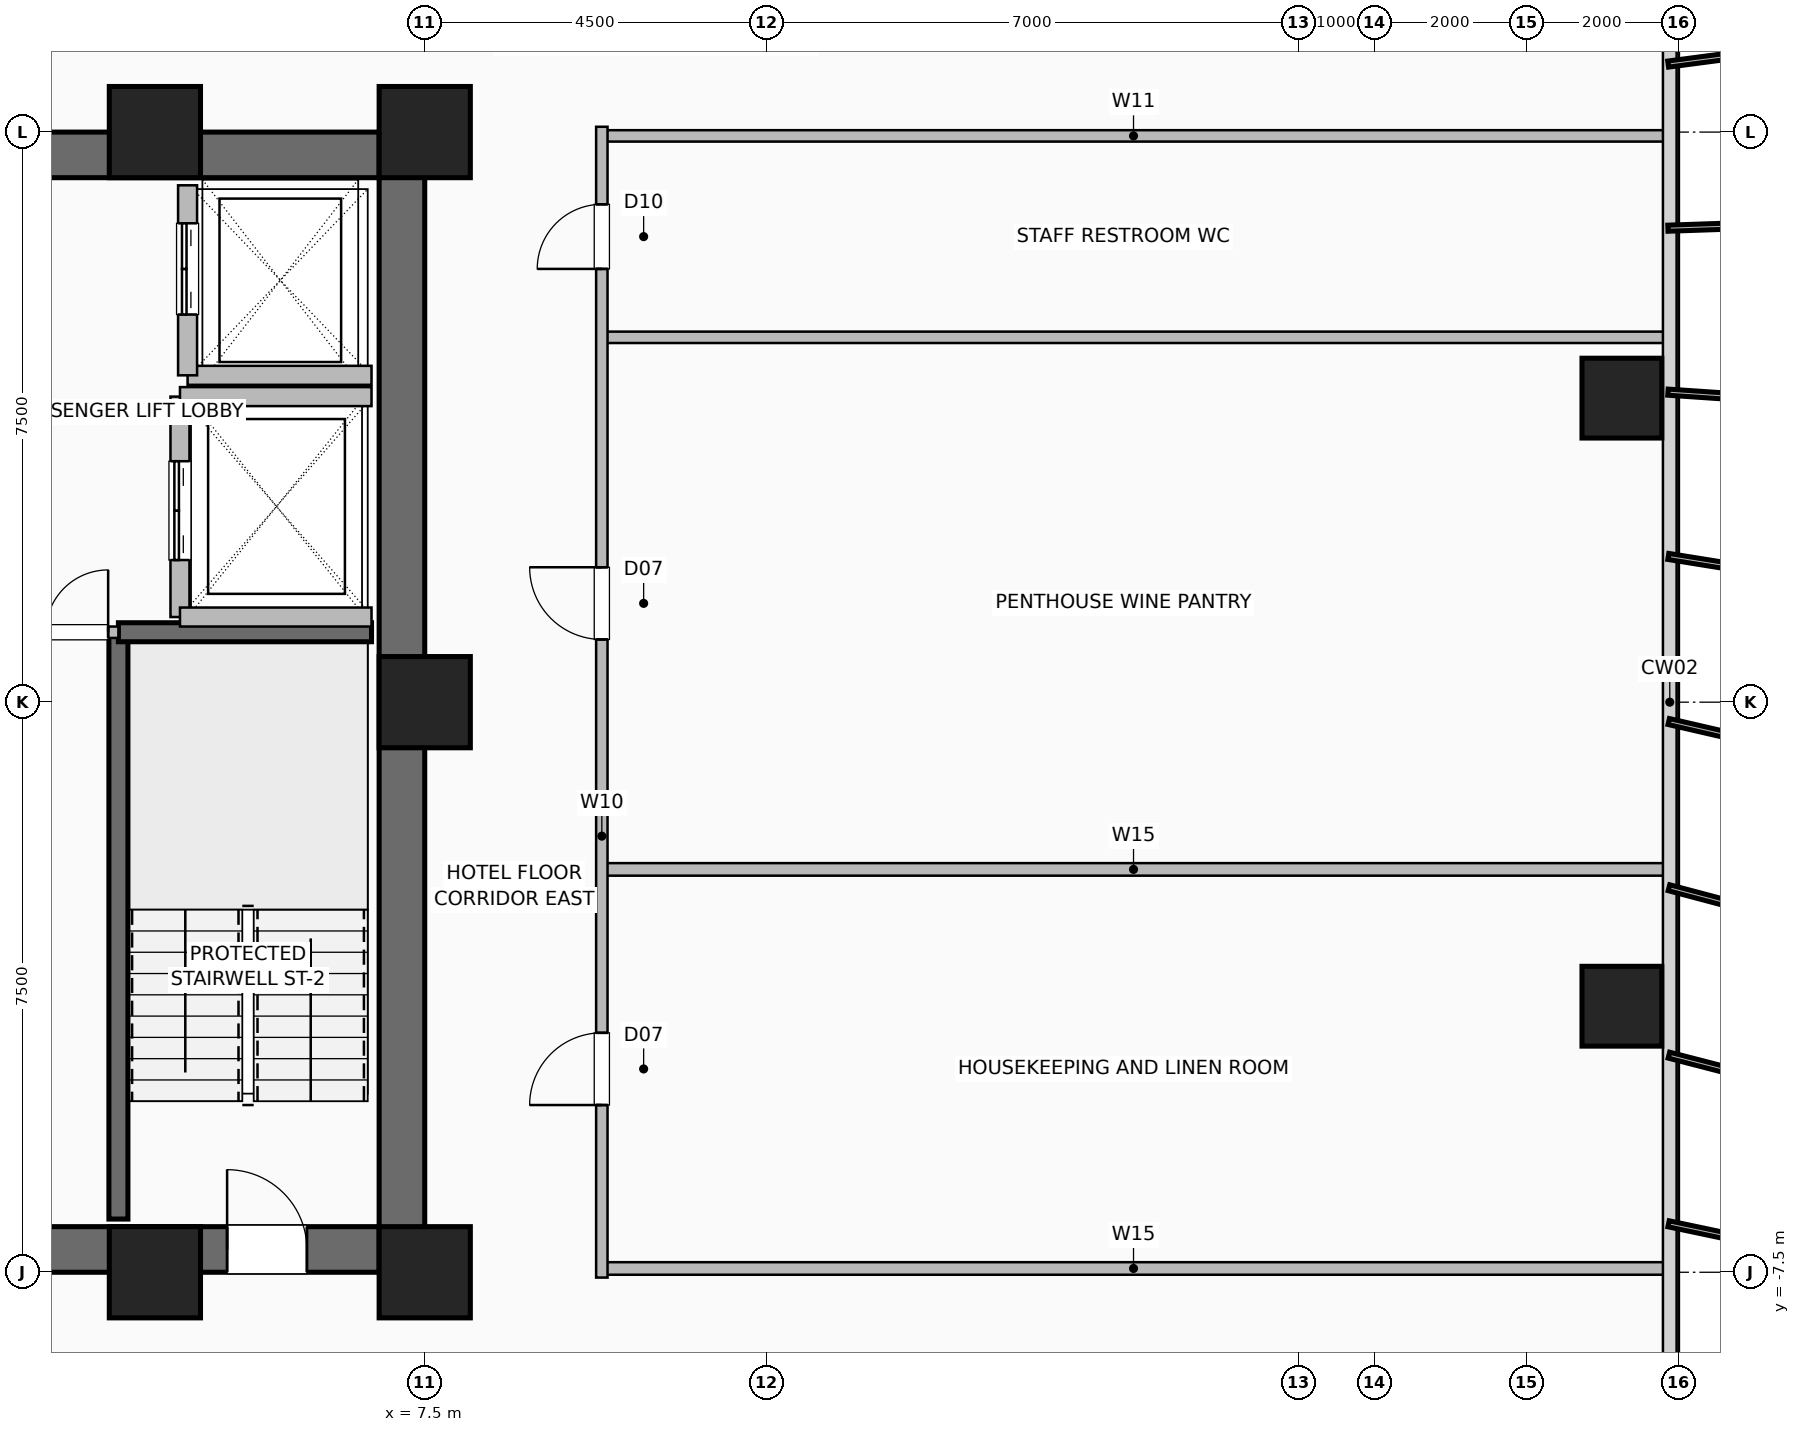
"""IFC4 building model, lengths in metres.
Left out: names, types, materials, properties, quantities, classifications, styles, units other than length and angle.
Written with IfcOpenShell. Run it as: python <this file> out.ifc"""

import sys

from ifc_helpers import new_model, si_unit, direction, frame, frame_2d, origin, origin_2d, place, context, subcontext, project, spatial, rectangle, hollow_rectangle, extrude, element, fill, save


model = new_model("IFC4")
c1 = context("Model", 3, precision=1e-05, world=origin(), true_north=direction((0.0, 1.0)))
c2 = subcontext(c1, "Body", "Model", "MODEL_VIEW")
j1 = project(units=[si_unit("LENGTHUNIT", "METRE"), si_unit("PLANEANGLEUNIT", "RADIAN")], contexts=[c1])
p1 = place(None, origin())
s1 = spatial("IfcSite", under=j1, at=p1, CompositionType="ELEMENT")
p2 = place(p1, origin())
s2 = spatial("IfcBuilding", under=s1, at=p2, CompositionType="ELEMENT")
p3 = place(p2, frame((0.0, 0.0, 79.5)))
s3 = spatial("IfcBuildingStorey", under=s2, at=p3, CompositionType="ELEMENT", Elevation=79.5)
for number, where, z_axis, x_axis in (
    (1, (3.95, -7.5, 0.0), (0.0, 0.0, 1.0), (1.0, 0.0, 0.0)),
    (2, (7.5, -7.5, 0.0), (0.0, 0.0, 1.0), (1.0, 0.0, 0.0)),
    (3, (7.5, 0.0, 0.0), (0.0, 0.0, 1.0), (1.0, 0.0, 0.0)),
    (4, (7.5, 7.5, 0.0), (0.0, 0.0, 1.0), (1.0, 0.0, 0.0)),
    (5, (3.95, 7.5, 0.0), (0.0, 0.0, 1.0), (1.0, 0.0, 0.0)),
):
    element("IfcColumn", number, at=place(p3, frame(where, z_axis=z_axis, x_axis=x_axis)), inside=s3, PredefinedType="COLUMN", context=c2, shape_type="SweptSolid", body=[
        extrude(hollow_rectangle(XDim=1.2, YDim=1.2, WallThickness=0.055, at=origin_2d()), origin(), (0.0, 0.0, 1.0), 3.5),
    ])
for number, where, z_axis, x_axis in (
    (6, (23.25, -4.0, 0.0), (0.0, 0.0, 1.0), (1.0, 0.0, 0.0)),
    (7, (23.25, 4.0, 0.0), (0.0, 0.0, 1.0), (1.0, 0.0, 0.0)),
):
    element("IfcColumn", number, at=place(p3, frame(where, z_axis=z_axis, x_axis=x_axis)), inside=s3, PredefinedType="COLUMN", context=c2, shape_type="SweptSolid", body=[
        extrude(hollow_rectangle(XDim=1.05, YDim=1.05, WallThickness=0.05, at=origin_2d()), origin(), (0.0, 0.0, 1.0), 3.5),
    ])
p4 = place(p3, frame((-7.5, -7.2, 0.0), z_axis=(0.0, 0.0, 1.0), x_axis=(1.0, 0.0, 0.0)))
e8 = element("IfcWall", 8, at=p4, inside=s3, PredefinedType="SHEAR", context=c2, shape_type="SweptSolid", body=[
    extrude(rectangle(XDim=15.0, YDim=0.6, at=frame_2d((7.5, 0.0))), origin(), (0.0, 0.0, 1.0), 3.15),
])
p5 = place(p4, frame((1.55, 0.0, 0.0)))
e9 = element("IfcOpeningElement", 9, at=p5, cuts=e8, PredefinedType="OPENING", context=c2, shape_type="SweptSolid", body=[
    extrude(rectangle(XDim=1.05, YDim=2.08, at=frame_2d((0.525, 1.04))), frame((0.0, 0.31, 0.0), z_axis=(0.0, -1.0, 0.0), x_axis=(1.0, 0.0, 0.0)), (0.0, 0.0, 1.0), 0.62),
])
p6 = place(p4, frame((12.4, 0.0, 0.0)))
e10 = element("IfcOpeningElement", 10, at=p6, cuts=e8, PredefinedType="OPENING", context=c2, shape_type="SweptSolid", body=[
    extrude(rectangle(XDim=1.05, YDim=2.08, at=frame_2d((0.525, 1.04))), frame((0.0, 0.31, 0.0), z_axis=(0.0, -1.0, 0.0), x_axis=(1.0, 0.0, 0.0)), (0.0, 0.0, 1.0), 0.62),
])
p7 = place(p4, frame((4.64, 0.0, 0.0)))
e11 = element("IfcOpeningElement", 11, at=p7, cuts=e8, PredefinedType="OPENING", context=c2, shape_type="SweptSolid", body=[
    extrude(rectangle(XDim=1.1, YDim=2.2, at=frame_2d((0.55, 1.1))), frame((0.0, 0.31, 0.0), z_axis=(0.0, -1.0, 0.0), x_axis=(1.0, 0.0, 0.0)), (0.0, 0.0, 1.0), 0.62),
])
p8 = place(p4, frame((6.52, 0.0, 0.0)))
e12 = element("IfcOpeningElement", 12, at=p8, cuts=e8, PredefinedType="OPENING", context=c2, shape_type="SweptSolid", body=[
    extrude(rectangle(XDim=1.1, YDim=2.2, at=frame_2d((0.55, 1.1))), frame((0.0, 0.31, 0.0), z_axis=(0.0, -1.0, 0.0), x_axis=(1.0, 0.0, 0.0)), (0.0, 0.0, 1.0), 0.62),
])
p9 = place(p4, frame((8.4, 0.0, 0.0)))
e13 = element("IfcOpeningElement", 13, at=p9, cuts=e8, PredefinedType="OPENING", context=c2, shape_type="SweptSolid", body=[
    extrude(rectangle(XDim=1.1, YDim=2.2, at=frame_2d((0.55, 1.1))), frame((0.0, 0.31, 0.0), z_axis=(0.0, -1.0, 0.0), x_axis=(1.0, 0.0, 0.0)), (0.0, 0.0, 1.0), 0.62),
])
for number, where, z_axis, x_axis in (
    (14, (-7.5, 7.2, 0.0), (0.0, 0.0, 1.0), (1.0, 0.0, 0.0)),
    (15, (7.2, -7.5, 0.0), (0.0, 0.0, 1.0), (0.0, 1.0, 0.0)),
):
    element("IfcWall", number, at=place(p3, frame(where, z_axis=z_axis, x_axis=x_axis)), inside=s3, PredefinedType="SHEAR", context=c2, shape_type="SweptSolid", body=[
        extrude(rectangle(XDim=15.0, YDim=0.6, at=frame_2d((7.5, 0.0))), origin(), (0.0, 0.0, 1.0), 3.15),
    ])
p10 = place(p3, frame((3.47, -6.8, 0.0), z_axis=(0.0, 0.0, 1.0), x_axis=(0.0, 1.0, 0.0)))
e16 = element("IfcWall", 16, at=p10, inside=s3, PredefinedType="SHEAR", context=c2, shape_type="SweptSolid", body=[
    extrude(rectangle(XDim=7.72, YDim=0.25, at=frame_2d((3.86, 0.0))), origin(), (0.0, 0.0, 1.0), 3.15),
])
p11 = place(p3, frame((3.47, 0.92, 0.0), z_axis=(0.0, 0.0, 1.0), x_axis=(1.0, 0.0, 0.0)))
e17 = element("IfcWall", 17, at=p11, inside=s3, PredefinedType="SHEAR", context=c2, shape_type="SweptSolid", body=[
    extrude(rectangle(XDim=3.33, YDim=0.25, at=frame_2d((1.665, 0.0))), origin(), (0.0, 0.0, 1.0), 3.15),
])
p12 = place(p3, frame((4.38, 4.3, 0.0), z_axis=(0.0, 0.0, 1.0), x_axis=(1.0, 0.0, 0.0)))
e18 = element("IfcWall", 18, at=p12, inside=s3, PredefinedType="SHEAR", context=c2, shape_type="SweptSolid", body=[
    extrude(rectangle(XDim=2.42, YDim=0.25, at=frame_2d((1.21, 0.0))), origin(), (0.0, 0.0, 1.0), 3.15),
])
p13 = place(p3, frame((4.38, 4.3, 0.0), z_axis=(0.0, 0.0, 1.0), x_axis=(0.0, 1.0, 0.0)))
e19 = element("IfcWall", 19, at=p13, inside=s3, PredefinedType="SHEAR", context=c2, shape_type="SweptSolid", body=[
    extrude(rectangle(XDim=2.5, YDim=0.25, at=frame_2d((1.25, 0.0))), origin(), (0.0, 0.0, 1.0), 3.15),
])
p14 = place(p13, frame((0.8, 0.0, 0.0)))
e20 = element("IfcOpeningElement", 20, at=p14, cuts=e19, PredefinedType="OPENING", context=c2, shape_type="SweptSolid", body=[
    extrude(rectangle(XDim=1.2, YDim=2.2, at=frame_2d((0.6, 1.1))), frame((0.0, 0.135, 0.0), z_axis=(0.0, -1.0, 0.0), x_axis=(1.0, 0.0, 0.0)), (0.0, 0.0, 1.0), 0.27),
])
p15 = place(p3, frame((4.28, 1.12, 0.0), z_axis=(0.0, 0.0, 1.0), x_axis=(0.0, 1.0, 0.0)))
e21 = element("IfcWall", 21, at=p15, inside=s3, PredefinedType="SHEAR", context=c2, shape_type="SweptSolid", body=[
    extrude(rectangle(XDim=2.9, YDim=0.25, at=frame_2d((1.45, 0.0))), origin(), (0.0, 0.0, 1.0), 3.15),
])
p16 = place(p15, frame((0.75, 0.0, 0.0)))
e22 = element("IfcOpeningElement", 22, at=p16, cuts=e21, PredefinedType="OPENING", context=c2, shape_type="SweptSolid", body=[
    extrude(rectangle(XDim=1.3, YDim=2.3, at=frame_2d((0.65, 1.15))), frame((0.0, 0.135, 0.0), z_axis=(0.0, -1.0, 0.0), x_axis=(1.0, 0.0, 0.0)), (0.0, 0.0, 1.0), 0.27),
])
for number, where, z_axis, x_axis in (
    (23, (4.28, 1.12, 0.0), (0.0, 0.0, 1.0), (1.0, 0.0, 0.0)),
    (24, (4.28, 4.02, 0.0), (0.0, 0.0, 1.0), (1.0, 0.0, 0.0)),
):
    element("IfcWall", number, at=place(p3, frame(where, z_axis=z_axis, x_axis=x_axis)), inside=s3, PredefinedType="SHEAR", context=c2, shape_type="SweptSolid", body=[
        extrude(rectangle(XDim=2.52, YDim=0.25, at=frame_2d((1.26, 0.0))), origin(), (0.0, 0.0, 1.0), 3.15),
    ])
p17 = place(p3, frame((2.38, 0.92, 0.0), z_axis=(0.0, 0.0, 1.0), x_axis=(1.0, 0.0, 0.0)))
e25 = element("IfcWall", 25, at=p17, inside=s3, PredefinedType="PARTITIONING", context=c2, shape_type="SweptSolid", body=[
    extrude(rectangle(XDim=1.09, YDim=0.15, at=frame_2d((0.545, 0.0))), origin(), (0.0, 0.0, 1.0), 3.15),
])
p18 = place(p17, frame((0.135, 0.0, 0.0)))
e26 = element("IfcOpeningElement", 26, at=p18, cuts=e25, PredefinedType="OPENING", context=c2, shape_type="SweptSolid", body=[
    extrude(rectangle(XDim=0.82, YDim=2.05, at=frame_2d((0.41, 1.025))), frame((0.0, 0.085, 0.0), z_axis=(0.0, -1.0, 0.0), x_axis=(1.0, 0.0, 0.0)), (0.0, 0.0, 1.0), 0.17),
])
for number, where, z_axis, x_axis in (
    (27, (9.83, -7.45, 0.0), (0.0, 0.0, 1.0), (1.0, 0.0, 0.0)),
    (28, (9.83, -2.2, 0.0), (0.0, 0.0, 1.0), (1.0, 0.0, 0.0)),
):
    element("IfcWall", number, at=place(p3, frame(where, z_axis=z_axis, x_axis=x_axis)), inside=s3, PredefinedType="PLUMBINGWALL", context=c2, shape_type="SweptSolid", body=[
        extrude(rectangle(XDim=13.99, YDim=0.165, at=frame_2d((6.995, 0.0))), origin(), (0.0, 0.0, 1.0), 3.15),
    ])
for number, where, z_axis, x_axis in (
    (29, (9.83, 4.8, 0.0), (0.0, 0.0, 1.0), (1.0, 0.0, 0.0)),
    (30, (9.83, 7.45, 0.0), (0.0, 0.0, 1.0), (1.0, 0.0, 0.0)),
):
    element("IfcWall", number, at=place(p3, frame(where, z_axis=z_axis, x_axis=x_axis)), inside=s3, PredefinedType="PARTITIONING", context=c2, shape_type="SweptSolid", body=[
        extrude(rectangle(XDim=13.99, YDim=0.15, at=frame_2d((6.995, 0.0))), origin(), (0.0, 0.0, 1.0), 3.15),
    ])
p19 = place(p3, frame((9.83, -7.57, 0.0), z_axis=(0.0, 0.0, 1.0), x_axis=(0.0, 1.0, 0.0)))
e31 = element("IfcWall", 31, at=p19, inside=s3, PredefinedType="PARTITIONING", context=c2, shape_type="SweptSolid", body=[
    extrude(rectangle(XDim=15.14, YDim=0.15, at=frame_2d((7.57, 0.0))), origin(), (0.0, 0.0, 1.0), 3.15),
])
p20 = place(p19, frame((2.27, 0.0, 0.0)))
e32 = element("IfcOpeningElement", 32, at=p20, cuts=e31, PredefinedType="OPENING", context=c2, shape_type="SweptSolid", body=[
    extrude(rectangle(XDim=0.95, YDim=2.06, at=frame_2d((0.475, 1.03))), frame((0.0, 0.085, 0.0), z_axis=(0.0, -1.0, 0.0), x_axis=(1.0, 0.0, 0.0)), (0.0, 0.0, 1.0), 0.17),
])
p21 = place(p19, frame((8.395, 0.0, 0.0)))
e33 = element("IfcOpeningElement", 33, at=p21, cuts=e31, PredefinedType="OPENING", context=c2, shape_type="SweptSolid", body=[
    extrude(rectangle(XDim=0.95, YDim=2.06, at=frame_2d((0.475, 1.03))), frame((0.0, 0.085, 0.0), z_axis=(0.0, -1.0, 0.0), x_axis=(1.0, 0.0, 0.0)), (0.0, 0.0, 1.0), 0.17),
])
p22 = place(p19, frame((13.27, 0.0, 0.0)))
e34 = element("IfcOpeningElement", 34, at=p22, cuts=e31, PredefinedType="OPENING", context=c2, shape_type="SweptSolid", body=[
    extrude(rectangle(XDim=0.85, YDim=2.05, at=frame_2d((0.425, 1.025))), frame((0.0, 0.085, 0.0), z_axis=(0.0, -1.0, 0.0), x_axis=(1.0, 0.0, 0.0)), (0.0, 0.0, 1.0), 0.17),
])
p23 = place(p6, origin())
e35 = element("IfcDoor", 35, at=p23, inside=s3, OperationType="SINGLE_SWING_LEFT", PredefinedType="DOOR", context=c2, shape_type="SweptSolid", body=[
    extrude(rectangle(XDim=1.05, YDim=2.08, at=frame_2d((0.525, 1.04))), frame((0.0, 0.025, 0.0), z_axis=(0.0, -1.0, 0.0), x_axis=(1.0, 0.0, 0.0)), (0.0, 0.0, 1.0), 0.05),
])
fill(e10, e35)
p24 = place(p14, origin())
e36 = element("IfcDoor", 36, at=p24, inside=s3, OperationType="DOUBLE_DOOR_SLIDING", PredefinedType="DOOR", context=c2, shape_type="SweptSolid", body=[
    extrude(rectangle(XDim=1.2, YDim=2.2, at=frame_2d((0.6, 1.1))), frame((0.0, 0.025, 0.0), z_axis=(0.0, -1.0, 0.0), x_axis=(1.0, 0.0, 0.0)), (0.0, 0.0, 1.0), 0.05),
])
fill(e20, e36)
p25 = place(p16, origin())
e37 = element("IfcDoor", 37, at=p25, inside=s3, OperationType="DOUBLE_DOOR_SLIDING", PredefinedType="DOOR", context=c2, shape_type="SweptSolid", body=[
    extrude(rectangle(XDim=1.3, YDim=2.3, at=frame_2d((0.65, 1.15))), frame((0.0, 0.025, 0.0), z_axis=(0.0, -1.0, 0.0), x_axis=(1.0, 0.0, 0.0)), (0.0, 0.0, 1.0), 0.05),
])
fill(e22, e37)
p26 = place(p18, origin())
e38 = element("IfcDoor", 38, at=p26, inside=s3, OperationType="SINGLE_SWING_RIGHT", PredefinedType="DOOR", context=c2, shape_type="SweptSolid", body=[
    extrude(rectangle(XDim=0.82, YDim=2.05, at=frame_2d((0.41, 1.025))), frame((0.0, 0.025, 0.0), z_axis=(0.0, -1.0, 0.0), x_axis=(1.0, 0.0, 0.0)), (0.0, 0.0, 1.0), 0.05),
])
fill(e26, e38)
p27 = place(p20, origin())
e39 = element("IfcDoor", 39, at=p27, inside=s3, OperationType="SINGLE_SWING_LEFT", PredefinedType="DOOR", context=c2, shape_type="SweptSolid", body=[
    extrude(rectangle(XDim=0.95, YDim=2.06, at=frame_2d((0.475, 1.03))), frame((0.0, 0.025, 0.0), z_axis=(0.0, -1.0, 0.0), x_axis=(1.0, 0.0, 0.0)), (0.0, 0.0, 1.0), 0.05),
])
fill(e32, e39)
p28 = place(p21, origin())
e40 = element("IfcDoor", 40, at=p28, inside=s3, OperationType="SINGLE_SWING_RIGHT", PredefinedType="DOOR", context=c2, shape_type="SweptSolid", body=[
    extrude(rectangle(XDim=0.95, YDim=2.06, at=frame_2d((0.475, 1.03))), frame((0.0, 0.025, 0.0), z_axis=(0.0, -1.0, 0.0), x_axis=(1.0, 0.0, 0.0)), (0.0, 0.0, 1.0), 0.05),
])
fill(e33, e40)
p29 = place(p22, origin())
e41 = element("IfcDoor", 41, at=p29, inside=s3, OperationType="SINGLE_SWING_LEFT", PredefinedType="DOOR", context=c2, shape_type="SweptSolid", body=[
    extrude(rectangle(XDim=0.85, YDim=2.05, at=frame_2d((0.425, 1.025))), frame((0.0, 0.025, 0.0), z_axis=(0.0, -1.0, 0.0), x_axis=(1.0, 0.0, 0.0)), (0.0, 0.0, 1.0), 0.05),
])
fill(e34, e41)
save(model, sys.argv[1])
